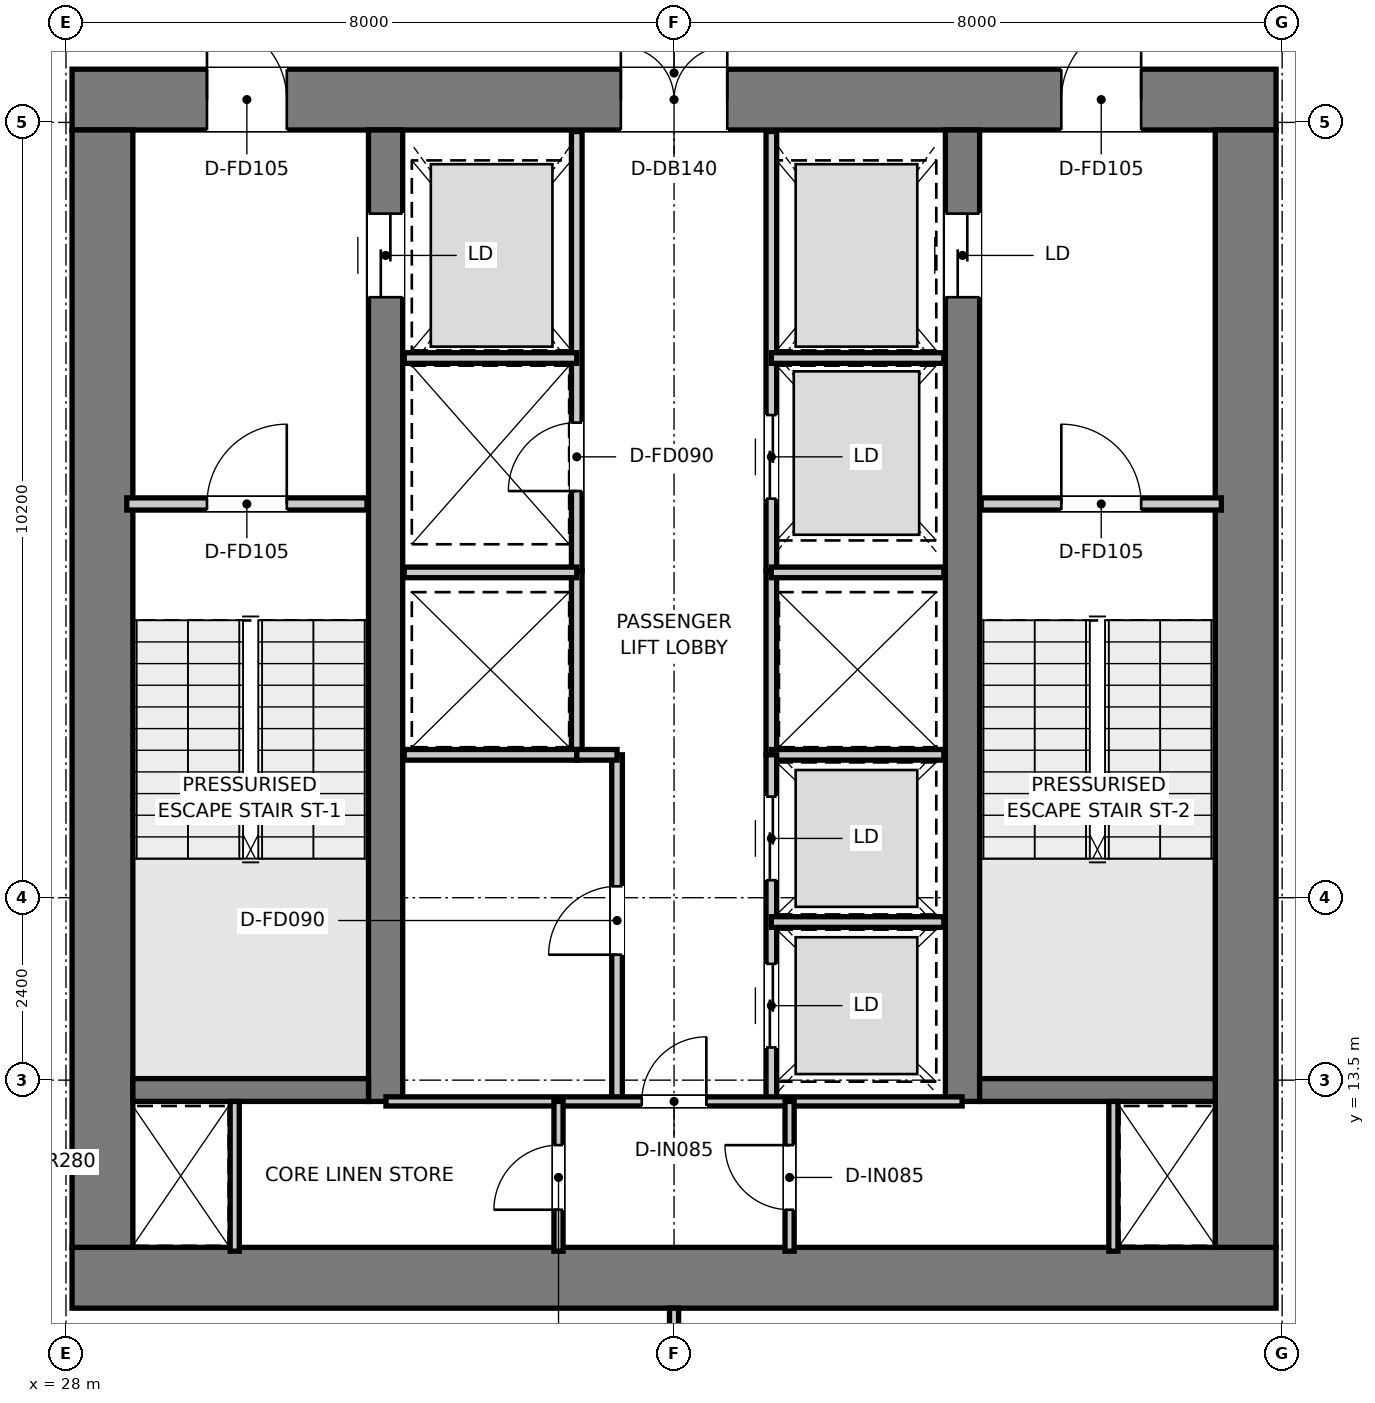
"""IFC4 building model, lengths in metres.
Left out: names, types, materials, properties, quantities, classifications, styles, units other than length and angle.
Written with IfcOpenShell. Run it as: python <this file> out.ifc"""

import sys

from ifc_helpers import new_model, si_unit, direction, frame, frame_2d, origin, place, context, subcontext, project, spatial, rectangle, extrude, element, fill, save


model = new_model("IFC4")
c1 = context("Model", 3, precision=1e-05, world=origin(), true_north=direction((0.0, 1.0)))
c2 = subcontext(c1, "Body", "Model", "MODEL_VIEW")
j1 = project(units=[si_unit("LENGTHUNIT", "METRE"), si_unit("PLANEANGLEUNIT", "RADIAN")], contexts=[c1])
p1 = place(None, origin())
s1 = spatial("IfcSite", under=j1, at=p1, CompositionType="ELEMENT")
p2 = place(p1, origin())
s2 = spatial("IfcBuilding", under=s1, at=p2, CompositionType="ELEMENT")
p3 = place(p2, frame((0.0, 0.0, 169.9)))
s3 = spatial("IfcBuildingStorey", under=s2, at=p3, CompositionType="ELEMENT", Elevation=169.9)
p4 = place(p3, frame((28.08, 10.9, 0.0), z_axis=(0.0, 0.0, 1.0), x_axis=(1.0, 0.0, 0.0)))
e1 = element("IfcWall", 1, at=p4, inside=s3, PredefinedType="SHEAR", context=c2, shape_type="SweptSolid", body=[
    extrude(rectangle(XDim=15.84, YDim=0.8, at=frame_2d((7.92, 0.0))), origin(), (0.0, 0.0, 1.0), 3.95),
])
p5 = place(p3, frame((28.08, 26.4, 0.0), z_axis=(0.0, 0.0, 1.0), x_axis=(1.0, 0.0, 0.0)))
e2 = element("IfcWall", 2, at=p5, inside=s3, PredefinedType="SHEAR", context=c2, shape_type="SweptSolid", body=[
    extrude(rectangle(XDim=15.84, YDim=0.8, at=frame_2d((7.92, 0.0))), origin(), (0.0, 0.0, 1.0), 3.95),
])
p6 = place(p5, frame((7.22, 0.0, 0.0)))
e3 = element("IfcOpeningElement", 3, at=p6, cuts=e2, PredefinedType="OPENING", context=c2, shape_type="SweptSolid", body=[
    extrude(rectangle(XDim=1.4, YDim=2.2, at=frame_2d((0.7, 1.1))), frame((0.0, 0.41, 0.0), z_axis=(0.0, -1.0, 0.0), x_axis=(1.0, 0.0, 0.0)), (0.0, 0.0, 1.0), 0.82),
])
p7 = place(p5, frame((1.775, 0.0, 0.0)))
e4 = element("IfcOpeningElement", 4, at=p7, cuts=e2, PredefinedType="OPENING", context=c2, shape_type="SweptSolid", body=[
    extrude(rectangle(XDim=1.05, YDim=2.1, at=frame_2d((0.525, 1.05))), frame((0.0, 0.41, 0.0), z_axis=(0.0, -1.0, 0.0), x_axis=(1.0, 0.0, 0.0)), (0.0, 0.0, 1.0), 0.82),
])
p8 = place(p5, frame((13.015, 0.0, 0.0)))
e5 = element("IfcOpeningElement", 5, at=p8, cuts=e2, PredefinedType="OPENING", context=c2, shape_type="SweptSolid", body=[
    extrude(rectangle(XDim=1.05, YDim=2.1, at=frame_2d((0.525, 1.05))), frame((0.0, 0.41, 0.0), z_axis=(0.0, -1.0, 0.0), x_axis=(1.0, 0.0, 0.0)), (0.0, 0.0, 1.0), 0.82),
])
for number, where, z_axis, x_axis in (
    (6, (28.48, 11.3, 0.0), (0.0, 0.0, 1.0), (0.0, 1.0, 0.0)),
    (7, (43.52, 11.3, 0.0), (0.0, 0.0, 1.0), (0.0, 1.0, 0.0)),
):
    element("IfcWall", number, at=place(p3, frame(where, z_axis=z_axis, x_axis=x_axis)), inside=s3, PredefinedType="SHEAR", context=c2, shape_type="SweptSolid", body=[
        extrude(rectangle(XDim=14.7, YDim=0.8, at=frame_2d((7.35, 0.0))), origin(), (0.0, 0.0, 1.0), 3.95),
    ])
p9 = place(p3, frame((32.205, 13.22, 0.0), z_axis=(0.0, 0.0, 1.0), x_axis=(0.0, 1.0, 0.0)))
e8 = element("IfcWall", 8, at=p9, inside=s3, PredefinedType="SHEAR", context=c2, shape_type="SweptSolid", body=[
    extrude(rectangle(XDim=12.78, YDim=0.45, at=frame_2d((6.39, 0.0))), origin(), (0.0, 0.0, 1.0), 3.95),
])
p10 = place(p9, frame((10.58, 0.0, 0.0)))
e9 = element("IfcOpeningElement", 9, at=p10, cuts=e8, PredefinedType="OPENING", context=c2, shape_type="SweptSolid", body=[
    extrude(rectangle(XDim=1.1, YDim=2.15, at=frame_2d((0.55, 1.075))), frame((0.0, 0.235, 0.0), z_axis=(0.0, -1.0, 0.0), x_axis=(1.0, 0.0, 0.0)), (0.0, 0.0, 1.0), 0.47),
])
p11 = place(p3, frame((39.795, 13.22, 0.0), z_axis=(0.0, 0.0, 1.0), x_axis=(0.0, 1.0, 0.0)))
e10 = element("IfcWall", 10, at=p11, inside=s3, PredefinedType="SHEAR", context=c2, shape_type="SweptSolid", body=[
    extrude(rectangle(XDim=12.78, YDim=0.45, at=frame_2d((6.39, 0.0))), origin(), (0.0, 0.0, 1.0), 3.95),
])
p12 = place(p11, frame((10.58, 0.0, 0.0)))
e11 = element("IfcOpeningElement", 11, at=p12, cuts=e10, PredefinedType="OPENING", context=c2, shape_type="SweptSolid", body=[
    extrude(rectangle(XDim=1.1, YDim=2.15, at=frame_2d((0.55, 1.075))), frame((0.0, 0.235, 0.0), z_axis=(0.0, -1.0, 0.0), x_axis=(1.0, 0.0, 0.0)), (0.0, 0.0, 1.0), 0.47),
])
for number, where, z_axis, x_axis in (
    (12, (28.88, 13.37, 0.0), (0.0, 0.0, 1.0), (1.0, 0.0, 0.0)),
    (13, (40.02, 13.37, 0.0), (0.0, 0.0, 1.0), (1.0, 0.0, 0.0)),
):
    element("IfcWall", number, at=place(p3, frame(where, z_axis=z_axis, x_axis=x_axis)), inside=s3, PredefinedType="SHEAR", context=c2, shape_type="SweptSolid", body=[
        extrude(rectangle(XDim=3.1, YDim=0.3, at=frame_2d((1.55, 0.0))), origin(), (0.0, 0.0, 1.0), 3.95),
    ])
p13 = place(p3, frame((28.8, 21.08, 0.0), z_axis=(0.0, 0.0, 1.0), x_axis=(1.0, 0.0, 0.0)))
e14 = element("IfcWall", 14, at=p13, inside=s3, PredefinedType="PARTITIONING", context=c2, shape_type="SweptSolid", body=[
    extrude(rectangle(XDim=3.16, YDim=0.16, at=frame_2d((1.58, 0.0))), origin(), (0.0, 0.0, 1.0), 3.67),
])
p14 = place(p13, frame((1.055, 0.0, 0.0)))
e15 = element("IfcOpeningElement", 15, at=p14, cuts=e14, PredefinedType="OPENING", context=c2, shape_type="SweptSolid", body=[
    extrude(rectangle(XDim=1.05, YDim=2.1, at=frame_2d((0.525, 1.05))), frame((0.0, 0.09, 0.0), z_axis=(0.0, -1.0, 0.0), x_axis=(1.0, 0.0, 0.0)), (0.0, 0.0, 1.0), 0.18),
])
p15 = place(p3, frame((40.04, 21.08, 0.0), z_axis=(0.0, 0.0, 1.0), x_axis=(1.0, 0.0, 0.0)))
e16 = element("IfcWall", 16, at=p15, inside=s3, PredefinedType="PARTITIONING", context=c2, shape_type="SweptSolid", body=[
    extrude(rectangle(XDim=3.16, YDim=0.16, at=frame_2d((1.58, 0.0))), origin(), (0.0, 0.0, 1.0), 3.67),
])
p16 = place(p15, frame((1.055, 0.0, 0.0)))
e17 = element("IfcOpeningElement", 17, at=p16, cuts=e16, PredefinedType="OPENING", context=c2, shape_type="SweptSolid", body=[
    extrude(rectangle(XDim=1.05, YDim=2.1, at=frame_2d((0.525, 1.05))), frame((0.0, 0.09, 0.0), z_axis=(0.0, -1.0, 0.0), x_axis=(1.0, 0.0, 0.0)), (0.0, 0.0, 1.0), 0.18),
])
p17 = place(p3, frame((34.72, 20.2, 0.0), z_axis=(0.0, 0.0, 1.0), x_axis=(0.0, 1.0, 0.0)))
e18 = element("IfcWall", 18, at=p17, inside=s3, PredefinedType="PARTITIONING", context=c2, shape_type="SweptSolid", body=[
    extrude(rectangle(XDim=5.78, YDim=0.14, at=frame_2d((2.89, 0.0))), origin(), (0.0, 0.0, 1.0), 2.67),
])
p18 = place(p17, frame((1.05, 0.0, 0.0)))
e19 = element("IfcOpeningElement", 19, at=p18, cuts=e18, PredefinedType="OPENING", context=c2, shape_type="SweptSolid", body=[
    extrude(rectangle(XDim=0.9, YDim=2.1, at=frame_2d((0.45, 1.05))), frame((0.0, 0.08, 0.0), z_axis=(0.0, -1.0, 0.0), x_axis=(1.0, 0.0, 0.0)), (0.0, 0.0, 1.0), 0.16),
])
p19 = place(p3, frame((37.28, 20.2, 0.0), z_axis=(0.0, 0.0, 1.0), x_axis=(0.0, 1.0, 0.0)))
e20 = element("IfcWall", 20, at=p19, inside=s3, PredefinedType="PARTITIONING", context=c2, shape_type="SweptSolid", body=[
    extrude(rectangle(XDim=5.78, YDim=0.14, at=frame_2d((2.89, 0.0))), origin(), (0.0, 0.0, 1.0), 2.67),
])
p20 = place(p19, frame((0.95, 0.0, 0.0)))
e21 = element("IfcOpeningElement", 21, at=p20, cuts=e20, PredefinedType="OPENING", context=c2, shape_type="SweptSolid", body=[
    extrude(rectangle(XDim=1.1, YDim=2.15, at=frame_2d((0.55, 1.075))), frame((0.0, 0.08, 0.0), z_axis=(0.0, -1.0, 0.0), x_axis=(1.0, 0.0, 0.0)), (0.0, 0.0, 1.0), 0.16),
])
for number, where, z_axis, x_axis in (
    (22, (32.45, 23.0, 0.0), (0.0, 0.0, 1.0), (1.0, 0.0, 0.0)),
    (23, (37.28, 23.0, 0.0), (0.0, 0.0, 1.0), (1.0, 0.0, 0.0)),
):
    element("IfcWall", number, at=place(p3, frame(where, z_axis=z_axis, x_axis=x_axis)), inside=s3, PredefinedType="PARTITIONING", context=c2, shape_type="SweptSolid", body=[
        extrude(rectangle(XDim=2.27, YDim=0.14, at=frame_2d((1.135, 0.0))), origin(), (0.0, 0.0, 1.0), 2.67),
    ])
for number, where, z_axis, x_axis in (
    (24, (34.72, 17.78, 0.0), (0.0, 0.0, 1.0), (0.0, 1.0, 0.0)),
    (25, (37.28, 17.78, 0.0), (0.0, 0.0, 1.0), (0.0, 1.0, 0.0)),
):
    element("IfcWall", number, at=place(p3, frame(where, z_axis=z_axis, x_axis=x_axis)), inside=s3, PredefinedType="PARTITIONING", context=c2, shape_type="SweptSolid", body=[
        extrude(rectangle(XDim=2.42, YDim=0.14, at=frame_2d((1.21, 0.0))), origin(), (0.0, 0.0, 1.0), 3.67),
    ])
for number, where, z_axis, x_axis in (
    (26, (32.45, 17.78, 0.0), (0.0, 0.0, 1.0), (1.0, 0.0, 0.0)),
    (27, (32.45, 20.18, 0.0), (0.0, 0.0, 1.0), (1.0, 0.0, 0.0)),
    (28, (37.28, 17.78, 0.0), (0.0, 0.0, 1.0), (1.0, 0.0, 0.0)),
    (29, (37.28, 20.18, 0.0), (0.0, 0.0, 1.0), (1.0, 0.0, 0.0)),
):
    element("IfcWall", number, at=place(p3, frame(where, z_axis=z_axis, x_axis=x_axis)), inside=s3, PredefinedType="PARTITIONING", context=c2, shape_type="SweptSolid", body=[
        extrude(rectangle(XDim=2.27, YDim=0.14, at=frame_2d((1.135, 0.0))), origin(), (0.0, 0.0, 1.0), 3.67),
    ])
p21 = place(p3, frame((35.25, 13.22, 0.0), z_axis=(0.0, 0.0, 1.0), x_axis=(0.0, 1.0, 0.0)))
e30 = element("IfcWall", 30, at=p21, inside=s3, PredefinedType="PARTITIONING", context=c2, shape_type="SweptSolid", body=[
    extrude(rectangle(XDim=4.56, YDim=0.14, at=frame_2d((2.28, 0.0))), origin(), (0.0, 0.0, 1.0), 3.67),
])
p22 = place(p21, frame((1.93, 0.0, 0.0)))
e31 = element("IfcOpeningElement", 31, at=p22, cuts=e30, PredefinedType="OPENING", context=c2, shape_type="SweptSolid", body=[
    extrude(rectangle(XDim=0.9, YDim=2.1, at=frame_2d((0.45, 1.05))), frame((0.0, 0.08, 0.0), z_axis=(0.0, -1.0, 0.0), x_axis=(1.0, 0.0, 0.0)), (0.0, 0.0, 1.0), 0.16),
])
p23 = place(p3, frame((34.72, 17.78, 0.0), z_axis=(0.0, 0.0, 1.0), x_axis=(1.0, 0.0, 0.0)))
e32 = element("IfcWall", 32, at=p23, inside=s3, PredefinedType="PARTITIONING", context=c2, shape_type="SweptSolid", body=[
    extrude(rectangle(XDim=0.53, YDim=0.14, at=frame_2d((0.265, 0.0))), origin(), (0.0, 0.0, 1.0), 3.67),
])
p24 = place(p3, frame((37.28, 13.22, 0.0), z_axis=(0.0, 0.0, 1.0), x_axis=(0.0, 1.0, 0.0)))
e33 = element("IfcWall", 33, at=p24, inside=s3, PredefinedType="PARTITIONING", context=c2, shape_type="SweptSolid", body=[
    extrude(rectangle(XDim=4.56, YDim=0.14, at=frame_2d((2.28, 0.0))), origin(), (0.0, 0.0, 1.0), 3.67),
])
p25 = place(p24, frame((0.71, 0.0, 0.0)))
e34 = element("IfcOpeningElement", 34, at=p25, cuts=e33, PredefinedType="OPENING", context=c2, shape_type="SweptSolid", body=[
    extrude(rectangle(XDim=1.1, YDim=2.15, at=frame_2d((0.55, 1.075))), frame((0.0, 0.08, 0.0), z_axis=(0.0, -1.0, 0.0), x_axis=(1.0, 0.0, 0.0)), (0.0, 0.0, 1.0), 0.16),
])
p26 = place(p24, frame((2.91, 0.0, 0.0)))
e35 = element("IfcOpeningElement", 35, at=p26, cuts=e33, PredefinedType="OPENING", context=c2, shape_type="SweptSolid", body=[
    extrude(rectangle(XDim=1.1, YDim=2.15, at=frame_2d((0.55, 1.075))), frame((0.0, 0.08, 0.0), z_axis=(0.0, -1.0, 0.0), x_axis=(1.0, 0.0, 0.0)), (0.0, 0.0, 1.0), 0.16),
])
p27 = place(p3, frame((37.28, 15.58, 0.0), z_axis=(0.0, 0.0, 1.0), x_axis=(1.0, 0.0, 0.0)))
e36 = element("IfcWall", 36, at=p27, inside=s3, PredefinedType="PARTITIONING", context=c2, shape_type="SweptSolid", body=[
    extrude(rectangle(XDim=2.27, YDim=0.14, at=frame_2d((1.135, 0.0))), origin(), (0.0, 0.0, 1.0), 3.67),
])
for number, where, z_axis, x_axis in (
    (37, (30.22, 11.25, 0.0), (0.0, 0.0, 1.0), (0.0, 1.0, 0.0)),
    (38, (41.78, 11.25, 0.0), (0.0, 0.0, 1.0), (0.0, 1.0, 0.0)),
):
    element("IfcWall", number, at=place(p3, frame(where, z_axis=z_axis, x_axis=x_axis)), inside=s3, PredefinedType="PARTITIONING", context=c2, shape_type="SweptSolid", body=[
        extrude(rectangle(XDim=1.97, YDim=0.12, at=frame_2d((0.985, 0.0))), origin(), (0.0, 0.0, 1.0), 3.67),
    ])
p28 = place(p3, frame((32.21, 13.22, 0.0), z_axis=(0.0, 0.0, 1.0), x_axis=(1.0, 0.0, 0.0)))
e39 = element("IfcWall", 39, at=p28, inside=s3, PredefinedType="PARTITIONING", context=c2, shape_type="SweptSolid", body=[
    extrude(rectangle(XDim=7.58, YDim=0.12, at=frame_2d((3.79, 0.0))), origin(), (0.0, 0.0, 1.0), 3.67),
])
p29 = place(p28, frame((3.365, 0.0, 0.0)))
e40 = element("IfcOpeningElement", 40, at=p29, cuts=e39, PredefinedType="OPENING", context=c2, shape_type="SweptSolid", body=[
    extrude(rectangle(XDim=0.85, YDim=2.1, at=frame_2d((0.425, 1.05))), frame((0.0, 0.07, 0.0), z_axis=(0.0, -1.0, 0.0), x_axis=(1.0, 0.0, 0.0)), (0.0, 0.0, 1.0), 0.14),
])
p30 = place(p3, frame((34.48, 11.25, 0.0), z_axis=(0.0, 0.0, 1.0), x_axis=(0.0, 1.0, 0.0)))
e41 = element("IfcWall", 41, at=p30, inside=s3, PredefinedType="PARTITIONING", context=c2, shape_type="SweptSolid", body=[
    extrude(rectangle(XDim=1.97, YDim=0.12, at=frame_2d((0.985, 0.0))), origin(), (0.0, 0.0, 1.0), 3.67),
])
p31 = place(p30, frame((0.545, 0.0, 0.0)))
e42 = element("IfcOpeningElement", 42, at=p31, cuts=e41, PredefinedType="OPENING", context=c2, shape_type="SweptSolid", body=[
    extrude(rectangle(XDim=0.85, YDim=2.1, at=frame_2d((0.425, 1.05))), frame((0.0, 0.07, 0.0), z_axis=(0.0, -1.0, 0.0), x_axis=(1.0, 0.0, 0.0)), (0.0, 0.0, 1.0), 0.14),
])
p32 = place(p3, frame((37.52, 11.25, 0.0), z_axis=(0.0, 0.0, 1.0), x_axis=(0.0, 1.0, 0.0)))
e43 = element("IfcWall", 43, at=p32, inside=s3, PredefinedType="PARTITIONING", context=c2, shape_type="SweptSolid", body=[
    extrude(rectangle(XDim=1.97, YDim=0.12, at=frame_2d((0.985, 0.0))), origin(), (0.0, 0.0, 1.0), 3.67),
])
p33 = place(p32, frame((0.545, 0.0, 0.0)))
e44 = element("IfcOpeningElement", 44, at=p33, cuts=e43, PredefinedType="OPENING", context=c2, shape_type="SweptSolid", body=[
    extrude(rectangle(XDim=0.85, YDim=2.1, at=frame_2d((0.425, 1.05))), frame((0.0, 0.07, 0.0), z_axis=(0.0, -1.0, 0.0), x_axis=(1.0, 0.0, 0.0)), (0.0, 0.0, 1.0), 0.14),
])
p34 = place(p3, frame((36.0, 1.579, 0.0), z_axis=(0.0, 0.0, 1.0), x_axis=(0.0, 1.0, 0.0)))
e45 = element("IfcWall", 45, at=p34, inside=s3, PredefinedType="PARTITIONING", context=c2, shape_type="SweptSolid", body=[
    extrude(rectangle(XDim=8.921, YDim=0.12, at=frame_2d((4.46, 0.0))), origin(), (0.0, 0.0, 1.0), 3.67),
])
p35 = place(p14, origin())
e46 = element("IfcDoor", 46, at=p35, inside=s3, OperationType="SINGLE_SWING_RIGHT", PredefinedType="DOOR", context=c2, shape_type="SweptSolid", body=[
    extrude(rectangle(XDim=1.05, YDim=2.1, at=frame_2d((0.525, 1.05))), frame((0.0, 0.025, 0.0), z_axis=(0.0, -1.0, 0.0), x_axis=(1.0, 0.0, 0.0)), (0.0, 0.0, 1.0), 0.05),
])
fill(e15, e46)
p36 = place(p16, origin())
e47 = element("IfcDoor", 47, at=p36, inside=s3, OperationType="SINGLE_SWING_LEFT", PredefinedType="DOOR", context=c2, shape_type="SweptSolid", body=[
    extrude(rectangle(XDim=1.05, YDim=2.1, at=frame_2d((0.525, 1.05))), frame((0.0, 0.025, 0.0), z_axis=(0.0, -1.0, 0.0), x_axis=(1.0, 0.0, 0.0)), (0.0, 0.0, 1.0), 0.05),
])
fill(e17, e47)
p37 = place(p6, origin())
e48 = element("IfcDoor", 48, at=p37, inside=s3, OperationType="DOUBLE_DOOR_SINGLE_SWING", PredefinedType="DOOR", context=c2, shape_type="SweptSolid", body=[
    extrude(rectangle(XDim=1.4, YDim=2.2, at=frame_2d((0.7, 1.1))), frame((0.0, 0.025, 0.0), z_axis=(0.0, -1.0, 0.0), x_axis=(1.0, 0.0, 0.0)), (0.0, 0.0, 1.0), 0.05),
])
fill(e3, e48)
p38 = place(p7, origin())
e49 = element("IfcDoor", 49, at=p38, inside=s3, OperationType="SINGLE_SWING_LEFT", PredefinedType="DOOR", context=c2, shape_type="SweptSolid", body=[
    extrude(rectangle(XDim=1.05, YDim=2.1, at=frame_2d((0.525, 1.05))), frame((0.0, 0.025, 0.0), z_axis=(0.0, -1.0, 0.0), x_axis=(1.0, 0.0, 0.0)), (0.0, 0.0, 1.0), 0.05),
])
fill(e4, e49)
p39 = place(p8, origin())
e50 = element("IfcDoor", 50, at=p39, inside=s3, OperationType="SINGLE_SWING_RIGHT", PredefinedType="DOOR", context=c2, shape_type="SweptSolid", body=[
    extrude(rectangle(XDim=1.05, YDim=2.1, at=frame_2d((0.525, 1.05))), frame((0.0, 0.025, 0.0), z_axis=(0.0, -1.0, 0.0), x_axis=(1.0, 0.0, 0.0)), (0.0, 0.0, 1.0), 0.05),
])
fill(e5, e50)
p40 = place(p10, origin())
e51 = element("IfcDoor", 51, at=p40, inside=s3, OperationType="DOUBLE_DOOR_SLIDING", PredefinedType="DOOR", context=c2, shape_type="SweptSolid", body=[
    extrude(rectangle(XDim=1.1, YDim=2.15, at=frame_2d((0.55, 1.075))), frame((0.0, 0.025, 0.0), z_axis=(0.0, -1.0, 0.0), x_axis=(1.0, 0.0, 0.0)), (0.0, 0.0, 1.0), 0.05),
])
fill(e9, e51)
p41 = place(p12, origin())
e52 = element("IfcDoor", 52, at=p41, inside=s3, OperationType="DOUBLE_DOOR_SLIDING", PredefinedType="DOOR", context=c2, shape_type="SweptSolid", body=[
    extrude(rectangle(XDim=1.1, YDim=2.15, at=frame_2d((0.55, 1.075))), frame((0.0, 0.025, 0.0), z_axis=(0.0, -1.0, 0.0), x_axis=(1.0, 0.0, 0.0)), (0.0, 0.0, 1.0), 0.05),
])
fill(e11, e52)
p42 = place(p18, origin())
e53 = element("IfcDoor", 53, at=p42, inside=s3, OperationType="SINGLE_SWING_LEFT", PredefinedType="DOOR", context=c2, shape_type="SweptSolid", body=[
    extrude(rectangle(XDim=0.9, YDim=2.1, at=frame_2d((0.45, 1.05))), frame((0.0, 0.025, 0.0), z_axis=(0.0, -1.0, 0.0), x_axis=(1.0, 0.0, 0.0)), (0.0, 0.0, 1.0), 0.05),
])
fill(e19, e53)
p43 = place(p20, origin())
e54 = element("IfcDoor", 54, at=p43, inside=s3, OperationType="DOUBLE_DOOR_SLIDING", PredefinedType="DOOR", context=c2, shape_type="SweptSolid", body=[
    extrude(rectangle(XDim=1.1, YDim=2.15, at=frame_2d((0.55, 1.075))), frame((0.0, 0.025, 0.0), z_axis=(0.0, -1.0, 0.0), x_axis=(1.0, 0.0, 0.0)), (0.0, 0.0, 1.0), 0.05),
])
fill(e21, e54)
p44 = place(p22, origin())
e55 = element("IfcDoor", 55, at=p44, inside=s3, OperationType="SINGLE_SWING_LEFT", PredefinedType="DOOR", context=c2, shape_type="SweptSolid", body=[
    extrude(rectangle(XDim=0.9, YDim=2.1, at=frame_2d((0.45, 1.05))), frame((0.0, 0.025, 0.0), z_axis=(0.0, -1.0, 0.0), x_axis=(1.0, 0.0, 0.0)), (0.0, 0.0, 1.0), 0.05),
])
fill(e31, e55)
p45 = place(p25, origin())
e56 = element("IfcDoor", 56, at=p45, inside=s3, OperationType="DOUBLE_DOOR_SLIDING", PredefinedType="DOOR", context=c2, shape_type="SweptSolid", body=[
    extrude(rectangle(XDim=1.1, YDim=2.15, at=frame_2d((0.55, 1.075))), frame((0.0, 0.025, 0.0), z_axis=(0.0, -1.0, 0.0), x_axis=(1.0, 0.0, 0.0)), (0.0, 0.0, 1.0), 0.05),
])
fill(e34, e56)
p46 = place(p26, origin())
e57 = element("IfcDoor", 57, at=p46, inside=s3, OperationType="DOUBLE_DOOR_SLIDING", PredefinedType="DOOR", context=c2, shape_type="SweptSolid", body=[
    extrude(rectangle(XDim=1.1, YDim=2.15, at=frame_2d((0.55, 1.075))), frame((0.0, 0.025, 0.0), z_axis=(0.0, -1.0, 0.0), x_axis=(1.0, 0.0, 0.0)), (0.0, 0.0, 1.0), 0.05),
])
fill(e35, e57)
p47 = place(p29, origin())
e58 = element("IfcDoor", 58, at=p47, inside=s3, OperationType="SINGLE_SWING_RIGHT", PredefinedType="DOOR", context=c2, shape_type="SweptSolid", body=[
    extrude(rectangle(XDim=0.85, YDim=2.1, at=frame_2d((0.425, 1.05))), frame((0.0, 0.025, 0.0), z_axis=(0.0, -1.0, 0.0), x_axis=(1.0, 0.0, 0.0)), (0.0, 0.0, 1.0), 0.05),
])
fill(e40, e58)
p48 = place(p31, origin())
e59 = element("IfcDoor", 59, at=p48, inside=s3, OperationType="SINGLE_SWING_LEFT", PredefinedType="DOOR", context=c2, shape_type="SweptSolid", body=[
    extrude(rectangle(XDim=0.85, YDim=2.1, at=frame_2d((0.425, 1.05))), frame((0.0, 0.025, 0.0), z_axis=(0.0, -1.0, 0.0), x_axis=(1.0, 0.0, 0.0)), (0.0, 0.0, 1.0), 0.05),
])
fill(e42, e59)
p49 = place(p33, origin())
e60 = element("IfcDoor", 60, at=p49, inside=s3, OperationType="SINGLE_SWING_RIGHT", PredefinedType="DOOR", context=c2, shape_type="SweptSolid", body=[
    extrude(rectangle(XDim=0.85, YDim=2.1, at=frame_2d((0.425, 1.05))), frame((0.0, 0.025, 0.0), z_axis=(0.0, -1.0, 0.0), x_axis=(1.0, 0.0, 0.0)), (0.0, 0.0, 1.0), 0.05),
])
fill(e44, e60)
save(model, sys.argv[1])
